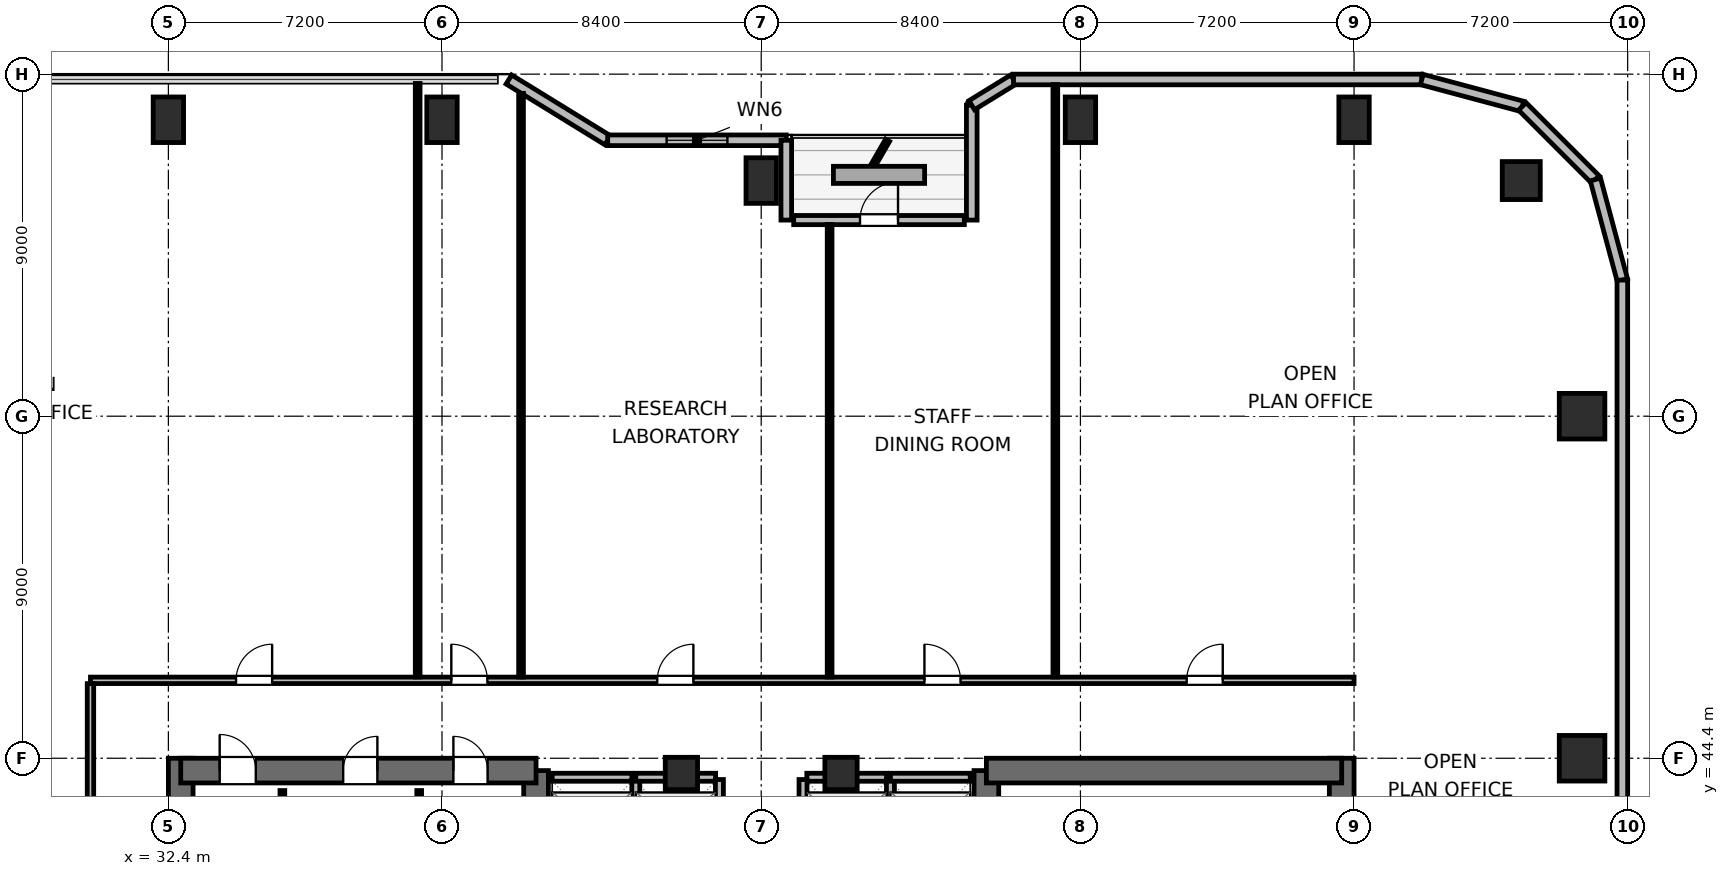
"""IFC4 building model, lengths in metres.
Left out: names, types, materials, properties, quantities, classifications, styles, units other than length and angle.
Written with IfcOpenShell. Run it as: python <this file> out.ifc"""

import sys

from ifc_helpers import new_model, si_unit, direction, frame, frame_2d, origin, origin_2d, place, context, subcontext, project, spatial, rectangle, circle, extrude, element, fill, save


model = new_model("IFC4")
c1 = context("Model", 3, precision=1e-05, world=origin(), true_north=direction((0.0, 1.0)))
c2 = subcontext(c1, "Body", "Model", "MODEL_VIEW")
j1 = project(units=[si_unit("LENGTHUNIT", "METRE"), si_unit("PLANEANGLEUNIT", "RADIAN")], contexts=[c1])
p1 = place(None, origin())
s1 = spatial("IfcSite", under=j1, at=p1, CompositionType="ELEMENT")
p2 = place(p1, origin())
s2 = spatial("IfcBuilding", under=s1, at=p2, CompositionType="ELEMENT")
p3 = place(p2, frame((0.0, 0.0, 181.8)))
s3 = spatial("IfcBuildingStorey", under=s2, at=p3, CompositionType="ELEMENT", Elevation=181.8)
p4 = place(p3, frame((32.725, 27.6, 0.0), z_axis=(0.0, 0.0, 1.0), x_axis=(0.0, 1.0, 0.0)))
e1 = element("IfcWall", 1, at=p4, inside=s3, PredefinedType="SHEAR", context=c2, shape_type="SweptSolid", body=[
    extrude(rectangle(XDim=16.8, YDim=0.65, at=frame_2d((8.4, 0.0))), origin(), (0.0, 0.0, 1.0), 4.5),
])
p5 = place(p3, frame((42.075, 37.8, 0.0), z_axis=(0.0, 0.0, 1.0), x_axis=(0.0, 1.0, 0.0)))
e2 = element("IfcWall", 2, at=p5, inside=s3, PredefinedType="SHEAR", context=c2, shape_type="SweptSolid", body=[
    extrude(rectangle(XDim=6.275, YDim=0.65, at=frame_2d((3.137, 0.0))), origin(), (0.0, 0.0, 1.0), 4.5),
])
p6 = place(p3, frame((32.725, 44.075, 0.0), z_axis=(0.0, 0.0, 1.0), x_axis=(1.0, 0.0, 0.0)))
e3 = element("IfcWall", 3, at=p6, inside=s3, PredefinedType="SHEAR", context=c2, shape_type="SweptSolid", body=[
    extrude(rectangle(XDim=9.35, YDim=0.65, at=frame_2d((4.675, 0.0))), origin(), (0.0, 0.0, 1.0), 4.5),
])
p7 = place(p6, frame((1.025, 0.0, 0.0)))
e4 = element("IfcOpeningElement", 4, at=p7, cuts=e3, PredefinedType="OPENING", context=c2, shape_type="SweptSolid", body=[
    extrude(rectangle(XDim=0.95, YDim=2.04, at=frame_2d((0.475, 1.02))), frame((0.0, 0.335, 0.0), z_axis=(0.0, -1.0, 0.0), x_axis=(1.0, 0.0, 0.0)), (0.0, 0.0, 1.0), 0.67),
])
p8 = place(p6, frame((4.275, 0.0, 0.0)))
e5 = element("IfcOpeningElement", 5, at=p8, cuts=e3, PredefinedType="OPENING", context=c2, shape_type="SweptSolid", body=[
    extrude(rectangle(XDim=0.9, YDim=2.02, at=frame_2d((0.45, 1.01))), frame((0.0, 0.335, 0.0), z_axis=(0.0, -1.0, 0.0), x_axis=(1.0, 0.0, 0.0)), (0.0, 0.0, 1.0), 0.67),
])
p9 = place(p6, frame((7.175, 0.0, 0.0)))
e6 = element("IfcOpeningElement", 6, at=p9, cuts=e3, PredefinedType="OPENING", context=c2, shape_type="SweptSolid", body=[
    extrude(rectangle(XDim=0.9, YDim=2.02, at=frame_2d((0.45, 1.01))), frame((0.0, 0.335, 0.0), z_axis=(0.0, -1.0, 0.0), x_axis=(1.0, 0.0, 0.0)), (0.0, 0.0, 1.0), 0.67),
])
p10 = place(p3, frame((53.925, 38.0, 0.0), z_axis=(0.0, 0.0, 1.0), x_axis=(0.0, 1.0, 0.0)))
e7 = element("IfcWall", 7, at=p10, inside=s3, PredefinedType="SHEAR", context=c2, shape_type="SweptSolid", body=[
    extrude(rectangle(XDim=6.075, YDim=0.65, at=frame_2d((3.038, 0.0))), origin(), (0.0, 0.0, 1.0), 4.5),
])
p11 = place(p3, frame((63.275, 27.6, 0.0), z_axis=(0.0, 0.0, 1.0), x_axis=(0.0, 1.0, 0.0)))
e8 = element("IfcWall", 8, at=p11, inside=s3, PredefinedType="SHEAR", context=c2, shape_type="SweptSolid", body=[
    extrude(rectangle(XDim=16.8, YDim=0.65, at=frame_2d((8.4, 0.0))), origin(), (0.0, 0.0, 1.0), 4.5),
])
p12 = place(p3, frame((53.925, 44.075, 0.0), z_axis=(0.0, 0.0, 1.0), x_axis=(1.0, 0.0, 0.0)))
e9 = element("IfcWall", 9, at=p12, inside=s3, PredefinedType="SHEAR", context=c2, shape_type="SweptSolid", body=[
    extrude(rectangle(XDim=9.35, YDim=0.65, at=frame_2d((4.675, 0.0))), origin(), (0.0, 0.0, 1.0), 4.5),
])
p13 = place(p3, frame((68.0, 59.6, 0.0), z_axis=(0.0, 0.0, 1.0), x_axis=(1.0, 0.0, 0.0)))
e10 = element("IfcColumn", 10, at=p13, inside=s3, PredefinedType="COLUMN", context=c2, shape_type="SweptSolid", body=[
    extrude(circle(Radius=0.5, at=origin_2d()), origin(), (0.0, 0.0, 1.0), 4.5),
])
for number, where, z_axis, x_axis in (
    (11, (32.4, 61.2, 0.0), (0.0, 0.0, 1.0), (1.0, 0.0, 0.0)),
    (12, (39.6, 61.2, 0.0), (0.0, 0.0, 1.0), (1.0, 0.0, 0.0)),
    (13, (48.0, 59.6, 0.0), (0.0, 0.0, 1.0), (1.0, 0.0, 0.0)),
    (14, (56.4, 61.2, 0.0), (0.0, 0.0, 1.0), (1.0, 0.0, 0.0)),
    (15, (63.6, 61.2, 0.0), (0.0, 0.0, 1.0), (1.0, 0.0, 0.0)),
):
    element("IfcColumn", number, at=place(p3, frame(where, z_axis=z_axis, x_axis=x_axis)), inside=s3, PredefinedType="COLUMN", context=c2, shape_type="SweptSolid", body=[
        extrude(rectangle(XDim=0.8, YDim=1.2, at=origin_2d()), origin(), (0.0, 0.0, 1.0), 4.5),
    ])
for number, where, z_axis, x_axis in (
    (16, (69.6, 44.4, 0.0), (0.0, 0.0, 1.0), (1.0, 0.0, 0.0)),
    (17, (69.6, 53.4, 0.0), (0.0, 0.0, 1.0), (1.0, 0.0, 0.0)),
):
    element("IfcColumn", number, at=place(p3, frame(where, z_axis=z_axis, x_axis=x_axis)), inside=s3, PredefinedType="COLUMN", context=c2, shape_type="SweptSolid", body=[
        extrude(rectangle(XDim=1.2, YDim=1.2, at=origin_2d()), origin(), (0.0, 0.0, 1.0), 4.5),
    ])
for number, where, z_axis, x_axis in (
    (18, (45.9, 44.0, 0.0), (0.0, 0.0, 1.0), (1.0, 0.0, 0.0)),
    (19, (50.1, 44.0, 0.0), (0.0, 0.0, 1.0), (1.0, 0.0, 0.0)),
):
    element("IfcColumn", number, at=place(p3, frame(where, z_axis=z_axis, x_axis=x_axis)), inside=s3, PredefinedType="COLUMN", context=c2, shape_type="SweptSolid", body=[
        extrude(rectangle(XDim=0.85, YDim=0.85, at=origin_2d()), origin(), (0.0, 0.0, 1.0), 4.5),
    ])
p14 = place(p3, frame((41.36, 62.26, 0.0), z_axis=(0.0, 0.0, 1.0), x_axis=(0.851652825334, -0.524106349037, 0.0)))
e20 = element("IfcWall", 20, at=p14, inside=s3, PredefinedType="SOLIDWALL", context=c2, shape_type="SweptSolid", body=[
    extrude(rectangle(XDim=3.053, YDim=0.28, at=frame_2d((1.526, 0.0))), origin(), (0.0, 0.0, 1.0), 2.865),
])
p15 = place(p3, frame((43.96, 60.66, 0.0), z_axis=(0.0, 0.0, 1.0), x_axis=(1.0, 0.0, 0.0)))
e21 = element("IfcWall", 21, at=p15, inside=s3, PredefinedType="SOLIDWALL", context=c2, shape_type="SweptSolid", body=[
    extrude(rectangle(XDim=4.699, YDim=0.28, at=frame_2d((2.35, 0.0))), origin(), (0.0, 0.0, 1.0), 2.865),
])
p16 = place(p15, frame((1.55, 0.0, 0.85)))
e22 = element("IfcOpeningElement", 22, at=p16, cuts=e21, PredefinedType="OPENING", context=c2, shape_type="SweptSolid", body=[
    extrude(rectangle(XDim=1.6, YDim=1.0, at=frame_2d((0.8, 0.5))), frame((0.0, 0.15, 0.0), z_axis=(0.0, -1.0, 0.0), x_axis=(1.0, 0.0, 0.0)), (0.0, 0.0, 1.0), 0.3),
])
p17 = place(p3, frame((48.66, 60.66, 0.0), z_axis=(0.0, 0.0, 1.0), x_axis=(0.0, -1.0, 0.0)))
e23 = element("IfcWall", 23, at=p17, inside=s3, PredefinedType="SOLIDWALL", context=c2, shape_type="SweptSolid", body=[
    extrude(rectangle(XDim=2.1, YDim=0.28, at=frame_2d((1.05, 0.0))), origin(), (0.0, 0.0, 1.0), 2.865),
])
p18 = place(p3, frame((48.855, 58.56, 0.0), z_axis=(0.0, 0.0, 1.0), x_axis=(1.0, 0.0, 0.0)))
e24 = element("IfcWall", 24, at=p18, inside=s3, PredefinedType="SOLIDWALL", context=c2, shape_type="SweptSolid", body=[
    extrude(rectangle(XDim=4.49, YDim=0.24, at=frame_2d((2.245, 0.0))), origin(), (0.0, 0.0, 1.0), 4.28),
])
p19 = place(p18, frame((1.745, 0.0, 0.0)))
e25 = element("IfcOpeningElement", 25, at=p19, cuts=e24, PredefinedType="OPENING", context=c2, shape_type="SweptSolid", body=[
    extrude(rectangle(XDim=1.0, YDim=2.02, at=frame_2d((0.5, 1.01))), frame((0.0, 0.13, 0.0), z_axis=(0.0, -1.0, 0.0), x_axis=(1.0, 0.0, 0.0)), (0.0, 0.0, 1.0), 0.26),
])
p20 = place(p3, frame((53.54, 58.56, 0.0), z_axis=(0.0, 0.0, 1.0), x_axis=(0.0, 1.0, 0.0)))
e26 = element("IfcWall", 26, at=p20, inside=s3, PredefinedType="SOLIDWALL", context=c2, shape_type="SweptSolid", body=[
    extrude(rectangle(XDim=3.024, YDim=0.28, at=frame_2d((1.512, 0.0))), origin(), (0.0, 0.0, 1.0), 2.865),
])
p21 = place(p3, frame((53.54, 61.584, 0.0), z_axis=(0.0, 0.0, 1.0), x_axis=(0.851801140441, 0.523865266212, 0.0)))
e27 = element("IfcWall", 27, at=p21, inside=s3, PredefinedType="SOLIDWALL", context=c2, shape_type="SweptSolid", body=[
    extrude(rectangle(XDim=1.291, YDim=0.28, at=frame_2d((0.646, 0.0))), origin(), (0.0, 0.0, 1.0), 4.28),
])
p22 = place(p3, frame((54.64, 62.26, 0.0), z_axis=(0.0, 0.0, 1.0), x_axis=(1.0, 0.0, 0.0)))
e28 = element("IfcWall", 28, at=p22, inside=s3, PredefinedType="SOLIDWALL", context=c2, shape_type="SweptSolid", body=[
    extrude(rectangle(XDim=10.742, YDim=0.28, at=frame_2d((5.371, 0.0))), origin(), (0.0, 0.0, 1.0), 4.28),
])
p23 = place(p3, frame((65.382, 62.26, 0.0), z_axis=(0.0, 0.0, 1.0), x_axis=(0.965971118627, -0.258649952598, 0.0)))
e29 = element("IfcWall", 29, at=p23, inside=s3, PredefinedType="SOLIDWALL", context=c2, shape_type="SweptSolid", body=[
    extrude(rectangle(XDim=2.739, YDim=0.28, at=frame_2d((1.37, 0.0))), origin(), (0.0, 0.0, 1.0), 4.28),
])
p24 = place(p3, frame((68.028, 61.552, 0.0), z_axis=(0.0, 0.0, 1.0), x_axis=(0.707061915429, -0.707151644098, 0.0)))
e30 = element("IfcWall", 30, at=p24, inside=s3, PredefinedType="SOLIDWALL", context=c2, shape_type="SweptSolid", body=[
    extrude(rectangle(XDim=2.721, YDim=0.28, at=frame_2d((1.36, 0.0))), origin(), (0.0, 0.0, 1.0), 4.28),
])
p25 = place(p3, frame((69.951, 59.627, 0.0), z_axis=(0.0, 0.0, 1.0), x_axis=(0.258672222976, -0.9659651552, 0.0)))
e31 = element("IfcWall", 31, at=p25, inside=s3, PredefinedType="SOLIDWALL", context=c2, shape_type="SweptSolid", body=[
    extrude(rectangle(XDim=2.739, YDim=0.28, at=frame_2d((1.37, 0.0))), origin(), (0.0, 0.0, 1.0), 4.28),
])
p26 = place(p3, frame((70.66, 56.982, 0.0), z_axis=(0.0, 0.0, 1.0), x_axis=(0.0, -1.0, 0.0)))
e32 = element("IfcWall", 32, at=p26, inside=s3, PredefinedType="SOLIDWALL", context=c2, shape_type="SweptSolid", body=[
    extrude(rectangle(XDim=14.242, YDim=0.28, at=frame_2d((7.121, 0.0))), origin(), (0.0, 0.0, 1.0), 4.28),
])
for number, where, z_axis, x_axis in (
    (33, (35.4, 41.095, 0.0), (0.0, 0.0, 1.0), (0.0, 1.0, 0.0)),
    (34, (39.0, 41.095, 0.0), (0.0, 0.0, 1.0), (0.0, 1.0, 0.0)),
):
    element("IfcWall", number, at=place(p3, frame(where, z_axis=z_axis, x_axis=x_axis)), inside=s3, PredefinedType="PARTITIONING", context=c2, shape_type="SweptSolid", body=[
        extrude(rectangle(XDim=2.455, YDim=0.125, at=frame_2d((1.228, 0.0))), origin(), (0.0, 0.0, 1.0), 4.28),
    ])
p27 = place(p3, frame((42.5, 43.9, 0.0), z_axis=(0.0, 0.0, 1.0), x_axis=(1.0, 0.0, 0.0)))
e35 = element("IfcWall", 35, at=p27, inside=s3, PredefinedType="PARTITIONING", context=c2, shape_type="SweptSolid", body=[
    extrude(rectangle(XDim=2.1, YDim=0.21, at=frame_2d((1.05, 0.0))), origin(), (0.0, 0.0, 1.0), 3.365),
])
p28 = place(p3, frame((44.7, 41.56, 0.0), z_axis=(0.0, 0.0, 1.0), x_axis=(0.0, 1.0, 0.0)))
e36 = element("IfcWall", 36, at=p28, inside=s3, PredefinedType="PARTITIONING", context=c2, shape_type="SweptSolid", body=[
    extrude(rectangle(XDim=2.28, YDim=0.21, at=frame_2d((1.14, 0.0))), origin(), (0.0, 0.0, 1.0), 4.28),
])
p29 = place(p3, frame((44.7, 43.9, 0.0), z_axis=(0.0, 0.0, 1.0), x_axis=(1.0, 0.0, 0.0)))
e37 = element("IfcWall", 37, at=p29, inside=s3, PredefinedType="PARTITIONING", context=c2, shape_type="SweptSolid", body=[
    extrude(rectangle(XDim=2.1, YDim=0.21, at=frame_2d((1.05, 0.0))), origin(), (0.0, 0.0, 1.0), 3.365),
])
p30 = place(p3, frame((46.9, 41.56, 0.0), z_axis=(0.0, 0.0, 1.0), x_axis=(0.0, 1.0, 0.0)))
e38 = element("IfcWall", 38, at=p30, inside=s3, PredefinedType="PARTITIONING", context=c2, shape_type="SweptSolid", body=[
    extrude(rectangle(XDim=2.28, YDim=0.21, at=frame_2d((1.14, 0.0))), origin(), (0.0, 0.0, 1.0), 4.28),
])
p31 = place(p3, frame((49.2, 43.9, 0.0), z_axis=(0.0, 0.0, 1.0), x_axis=(1.0, 0.0, 0.0)))
e39 = element("IfcWall", 39, at=p31, inside=s3, PredefinedType="PARTITIONING", context=c2, shape_type="SweptSolid", body=[
    extrude(rectangle(XDim=2.1, YDim=0.21, at=frame_2d((1.05, 0.0))), origin(), (0.0, 0.0, 1.0), 3.365),
])
for number, where, z_axis, x_axis in (
    (40, (49.1, 41.56, 0.0), (0.0, 0.0, 1.0), (0.0, 1.0, 0.0)),
    (41, (51.4, 41.56, 0.0), (0.0, 0.0, 1.0), (0.0, 1.0, 0.0)),
):
    element("IfcWall", number, at=place(p3, frame(where, z_axis=z_axis, x_axis=x_axis)), inside=s3, PredefinedType="PARTITIONING", context=c2, shape_type="SweptSolid", body=[
        extrude(rectangle(XDim=2.28, YDim=0.21, at=frame_2d((1.14, 0.0))), origin(), (0.0, 0.0, 1.0), 4.28),
    ])
p32 = place(p3, frame((51.4, 43.9, 0.0), z_axis=(0.0, 0.0, 1.0), x_axis=(1.0, 0.0, 0.0)))
e42 = element("IfcWall", 42, at=p32, inside=s3, PredefinedType="PARTITIONING", context=c2, shape_type="SweptSolid", body=[
    extrude(rectangle(XDim=2.1, YDim=0.21, at=frame_2d((1.05, 0.0))), origin(), (0.0, 0.0, 1.0), 3.365),
])
p33 = place(p3, frame((30.35, 46.45, 0.0), z_axis=(0.0, 0.0, 1.0), x_axis=(1.0, 0.0, 0.0)))
e43 = element("IfcWall", 43, at=p33, inside=s3, PredefinedType="PARTITIONING", context=c2, shape_type="SweptSolid", body=[
    extrude(rectangle(XDim=33.25, YDim=0.17, at=frame_2d((16.625, 0.0))), origin(), (0.0, 0.0, 1.0), 4.28),
])
p34 = place(p33, frame((3.83, 0.0, 0.0)))
e44 = element("IfcOpeningElement", 44, at=p34, cuts=e43, PredefinedType="OPENING", context=c2, shape_type="SweptSolid", body=[
    extrude(rectangle(XDim=0.95, YDim=2.04, at=frame_2d((0.475, 1.02))), frame((0.0, 0.095, 0.0), z_axis=(0.0, -1.0, 0.0), x_axis=(1.0, 0.0, 0.0)), (0.0, 0.0, 1.0), 0.19),
])
p35 = place(p33, frame((9.495, 0.0, 0.0)))
e45 = element("IfcOpeningElement", 45, at=p35, cuts=e43, PredefinedType="OPENING", context=c2, shape_type="SweptSolid", body=[
    extrude(rectangle(XDim=0.95, YDim=2.04, at=frame_2d((0.475, 1.02))), frame((0.0, 0.095, 0.0), z_axis=(0.0, -1.0, 0.0), x_axis=(1.0, 0.0, 0.0)), (0.0, 0.0, 1.0), 0.19),
])
p36 = place(p33, frame((14.915, 0.0, 0.0)))
e46 = element("IfcOpeningElement", 46, at=p36, cuts=e43, PredefinedType="OPENING", context=c2, shape_type="SweptSolid", body=[
    extrude(rectangle(XDim=0.95, YDim=2.04, at=frame_2d((0.475, 1.02))), frame((0.0, 0.095, 0.0), z_axis=(0.0, -1.0, 0.0), x_axis=(1.0, 0.0, 0.0)), (0.0, 0.0, 1.0), 0.19),
])
p37 = place(p33, frame((21.945, 0.0, 0.0)))
e47 = element("IfcOpeningElement", 47, at=p37, cuts=e43, PredefinedType="OPENING", context=c2, shape_type="SweptSolid", body=[
    extrude(rectangle(XDim=0.95, YDim=2.04, at=frame_2d((0.475, 1.02))), frame((0.0, 0.095, 0.0), z_axis=(0.0, -1.0, 0.0), x_axis=(1.0, 0.0, 0.0)), (0.0, 0.0, 1.0), 0.19),
])
p38 = place(p33, frame((28.845, 0.0, 0.0)))
e48 = element("IfcOpeningElement", 48, at=p38, cuts=e43, PredefinedType="OPENING", context=c2, shape_type="SweptSolid", body=[
    extrude(rectangle(XDim=0.95, YDim=2.04, at=frame_2d((0.475, 1.02))), frame((0.0, 0.095, 0.0), z_axis=(0.0, -1.0, 0.0), x_axis=(1.0, 0.0, 0.0)), (0.0, 0.0, 1.0), 0.19),
])
p39 = place(p3, frame((30.35, 37.1, 0.0), z_axis=(0.0, 0.0, 1.0), x_axis=(0.0, 1.0, 0.0)))
e49 = element("IfcWall", 49, at=p39, inside=s3, PredefinedType="PARTITIONING", context=c2, shape_type="SweptSolid", body=[
    extrude(rectangle(XDim=9.263, YDim=0.17, at=frame_2d((4.631, 0.0))), origin(), (0.0, 0.0, 1.0), 4.28),
])
p40 = place(p39, frame((4.2, 0.0, 0.0)))
e50 = element("IfcOpeningElement", 50, at=p40, cuts=e49, PredefinedType="OPENING", context=c2, shape_type="SweptSolid", body=[
    extrude(rectangle(XDim=0.95, YDim=2.04, at=frame_2d((0.475, 1.02))), frame((0.0, 0.095, 0.0), z_axis=(0.0, -1.0, 0.0), x_axis=(1.0, 0.0, 0.0)), (0.0, 0.0, 1.0), 0.19),
])
p41 = place(p3, frame((38.96, 46.537, 0.0), z_axis=(0.0, 0.0, 1.0), x_axis=(0.0, 1.0, 0.0)))
e51 = element("IfcWall", 51, at=p41, inside=s3, PredefinedType="PARTITIONING", context=c2, shape_type="SweptSolid", body=[
    extrude(rectangle(XDim=15.618, YDim=0.125, at=frame_2d((7.809, 0.0))), origin(), (0.0, 0.0, 1.0), 4.28),
])
p42 = place(p3, frame((41.68, 46.537, 0.0), z_axis=(0.0, 0.0, 1.0), x_axis=(0.0, 1.0, 0.0)))
e52 = element("IfcWall", 52, at=p42, inside=s3, PredefinedType="PARTITIONING", context=c2, shape_type="SweptSolid", body=[
    extrude(rectangle(XDim=15.358, YDim=0.125, at=frame_2d((7.679, 0.0))), origin(), (0.0, 0.0, 1.0), 3.643),
])
p43 = place(p3, frame((49.8, 46.537, 0.0), z_axis=(0.0, 0.0, 1.0), x_axis=(0.0, 1.0, 0.0)))
e53 = element("IfcWall", 53, at=p43, inside=s3, PredefinedType="PARTITIONING", context=c2, shape_type="SweptSolid", body=[
    extrude(rectangle(XDim=11.908, YDim=0.125, at=frame_2d((5.954, 0.0))), origin(), (0.0, 0.0, 1.0), 4.28),
])
p44 = place(p3, frame((55.74, 46.537, 0.0), z_axis=(0.0, 0.0, 1.0), x_axis=(0.0, 1.0, 0.0)))
e54 = element("IfcWall", 54, at=p44, inside=s3, PredefinedType="PARTITIONING", context=c2, shape_type="SweptSolid", body=[
    extrude(rectangle(XDim=15.588, YDim=0.125, at=frame_2d((7.794, 0.0))), origin(), (0.0, 0.0, 1.0), 3.643),
])
p45 = place(p16, origin())
e55 = element("IfcWindow", 55, at=p45, inside=s3, PartitioningType="SINGLE_PANEL", PredefinedType="WINDOW", context=c2, shape_type="SweptSolid", body=[
    extrude(rectangle(XDim=1.6, YDim=1.0, at=frame_2d((0.8, 0.5))), frame((0.0, 0.03, 0.0), z_axis=(0.0, -1.0, 0.0), x_axis=(1.0, 0.0, 0.0)), (0.0, 0.0, 1.0), 0.06),
])
fill(e22, e55)
p46 = place(p19, origin())
e56 = element("IfcDoor", 56, at=p46, inside=s3, OperationType="SINGLE_SWING_RIGHT", PredefinedType="DOOR", context=c2, shape_type="SweptSolid", body=[
    extrude(rectangle(XDim=1.0, YDim=2.02, at=frame_2d((0.5, 1.01))), frame((0.0, 0.025, 0.0), z_axis=(0.0, -1.0, 0.0), x_axis=(1.0, 0.0, 0.0)), (0.0, 0.0, 1.0), 0.05),
])
fill(e25, e56)
p47 = place(p7, origin())
e57 = element("IfcDoor", 57, at=p47, inside=s3, OperationType="SINGLE_SWING_LEFT", PredefinedType="DOOR", context=c2, shape_type="SweptSolid", body=[
    extrude(rectangle(XDim=0.95, YDim=2.04, at=frame_2d((0.475, 1.02))), frame((0.0, 0.025, 0.0), z_axis=(0.0, -1.0, 0.0), x_axis=(1.0, 0.0, 0.0)), (0.0, 0.0, 1.0), 0.05),
])
fill(e4, e57)
p48 = place(p8, origin())
e58 = element("IfcDoor", 58, at=p48, inside=s3, OperationType="SINGLE_SWING_RIGHT", PredefinedType="DOOR", context=c2, shape_type="SweptSolid", body=[
    extrude(rectangle(XDim=0.9, YDim=2.02, at=frame_2d((0.45, 1.01))), frame((0.0, 0.025, 0.0), z_axis=(0.0, -1.0, 0.0), x_axis=(1.0, 0.0, 0.0)), (0.0, 0.0, 1.0), 0.05),
])
fill(e5, e58)
p49 = place(p9, origin())
e59 = element("IfcDoor", 59, at=p49, inside=s3, OperationType="SINGLE_SWING_LEFT", PredefinedType="DOOR", context=c2, shape_type="SweptSolid", body=[
    extrude(rectangle(XDim=0.9, YDim=2.02, at=frame_2d((0.45, 1.01))), frame((0.0, 0.025, 0.0), z_axis=(0.0, -1.0, 0.0), x_axis=(1.0, 0.0, 0.0)), (0.0, 0.0, 1.0), 0.05),
])
fill(e6, e59)
p50 = place(p34, origin())
e60 = element("IfcDoor", 60, at=p50, inside=s3, OperationType="SINGLE_SWING_RIGHT", PredefinedType="DOOR", context=c2, shape_type="SweptSolid", body=[
    extrude(rectangle(XDim=0.95, YDim=2.04, at=frame_2d((0.475, 1.02))), frame((0.0, 0.025, 0.0), z_axis=(0.0, -1.0, 0.0), x_axis=(1.0, 0.0, 0.0)), (0.0, 0.0, 1.0), 0.05),
])
fill(e44, e60)
p51 = place(p35, origin())
e61 = element("IfcDoor", 61, at=p51, inside=s3, OperationType="SINGLE_SWING_LEFT", PredefinedType="DOOR", context=c2, shape_type="SweptSolid", body=[
    extrude(rectangle(XDim=0.95, YDim=2.04, at=frame_2d((0.475, 1.02))), frame((0.0, 0.025, 0.0), z_axis=(0.0, -1.0, 0.0), x_axis=(1.0, 0.0, 0.0)), (0.0, 0.0, 1.0), 0.05),
])
fill(e45, e61)
p52 = place(p36, origin())
e62 = element("IfcDoor", 62, at=p52, inside=s3, OperationType="SINGLE_SWING_RIGHT", PredefinedType="DOOR", context=c2, shape_type="SweptSolid", body=[
    extrude(rectangle(XDim=0.95, YDim=2.04, at=frame_2d((0.475, 1.02))), frame((0.0, 0.025, 0.0), z_axis=(0.0, -1.0, 0.0), x_axis=(1.0, 0.0, 0.0)), (0.0, 0.0, 1.0), 0.05),
])
fill(e46, e62)
p53 = place(p37, origin())
e63 = element("IfcDoor", 63, at=p53, inside=s3, OperationType="SINGLE_SWING_LEFT", PredefinedType="DOOR", context=c2, shape_type="SweptSolid", body=[
    extrude(rectangle(XDim=0.95, YDim=2.04, at=frame_2d((0.475, 1.02))), frame((0.0, 0.025, 0.0), z_axis=(0.0, -1.0, 0.0), x_axis=(1.0, 0.0, 0.0)), (0.0, 0.0, 1.0), 0.05),
])
fill(e47, e63)
p54 = place(p38, origin())
e64 = element("IfcDoor", 64, at=p54, inside=s3, OperationType="SINGLE_SWING_RIGHT", PredefinedType="DOOR", context=c2, shape_type="SweptSolid", body=[
    extrude(rectangle(XDim=0.95, YDim=2.04, at=frame_2d((0.475, 1.02))), frame((0.0, 0.025, 0.0), z_axis=(0.0, -1.0, 0.0), x_axis=(1.0, 0.0, 0.0)), (0.0, 0.0, 1.0), 0.05),
])
fill(e48, e64)
save(model, sys.argv[1])
